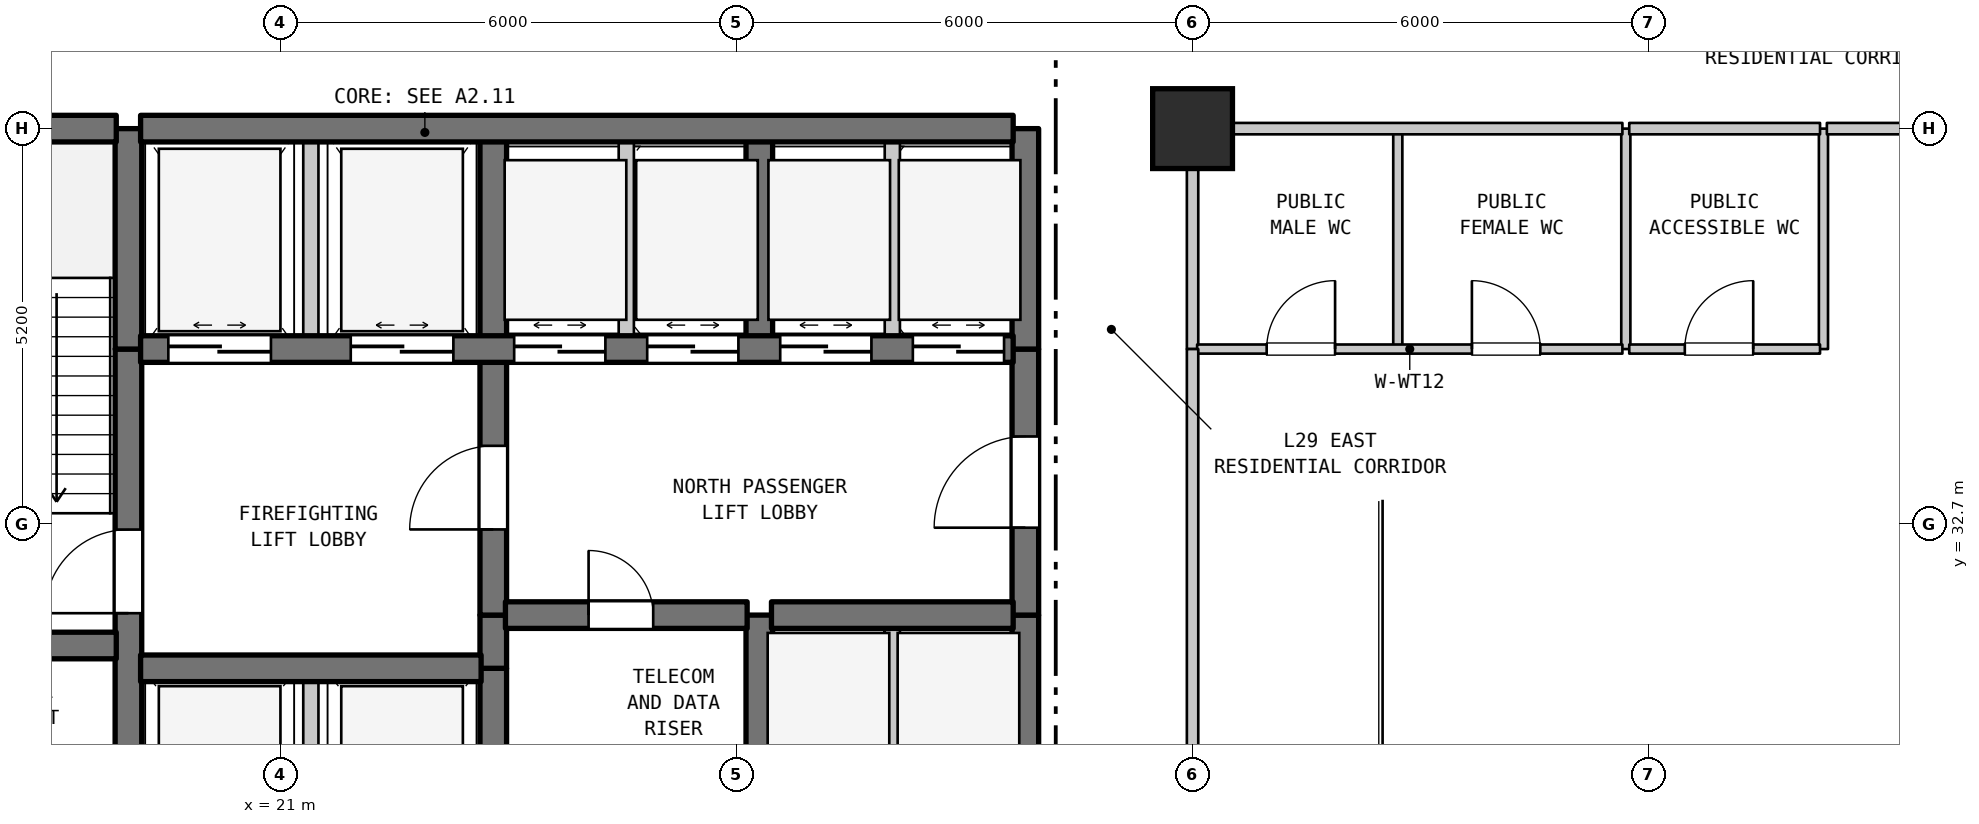
"""IFC4 building model, lengths in metres.
Left out: names, types, materials, properties, quantities, classifications, styles, units other than length and angle.
Written with IfcOpenShell. Run it as: python <this file> out.ifc"""

import sys

from ifc_helpers import new_model, si_unit, direction, frame, frame_2d, origin, origin_2d, place, context, subcontext, project, spatial, rectangle, extrude, element, fill, save


model = new_model("IFC4")
c1 = context("Model", 3, precision=1e-05, world=origin(), true_north=direction((0.0, 1.0)))
c2 = subcontext(c1, "Body", "Model", "MODEL_VIEW")
j1 = project(units=[si_unit("LENGTHUNIT", "METRE"), si_unit("PLANEANGLEUNIT", "RADIAN")], contexts=[c1])
p1 = place(None, origin())
s1 = spatial("IfcSite", under=j1, at=p1, CompositionType="ELEMENT")
p2 = place(p1, origin())
s2 = spatial("IfcBuilding", under=s1, at=p2, CompositionType="ELEMENT")
p3 = place(p2, frame((0.0, 0.0, 120.5)))
s3 = spatial("IfcBuildingStorey", under=s2, at=p3, CompositionType="ELEMENT", Elevation=120.5)
p4 = place(p3, frame((33.0, 37.9, 0.0), z_axis=(0.0, 0.0, 1.0), x_axis=(1.0, 0.0, 0.0)))
e1 = element("IfcColumn", 1, at=p4, inside=s3, PredefinedType="COLUMN", context=c2, shape_type="SweptSolid", body=[
    extrude(rectangle(XDim=1.05, YDim=1.05, at=origin_2d()), origin(), (0.0, 0.0, 1.0), 4.8),
])
p5 = place(p3, frame((19.0, 29.5, 0.0), z_axis=(0.0, 0.0, 1.0), x_axis=(0.0, 1.0, 0.0)))
e2 = element("IfcWall", 2, at=p5, inside=s3, PredefinedType="SHEAR", context=c2, shape_type="SweptSolid", body=[
    extrude(rectangle(XDim=5.5, YDim=0.35, at=frame_2d((2.75, 0.0))), origin(), (0.0, 0.0, 1.0), 4.48),
])
p6 = place(p5, frame((2.025, 0.0, 0.0)))
e3 = element("IfcOpeningElement", 3, at=p6, cuts=e2, PredefinedType="OPENING", context=c2, shape_type="SweptSolid", body=[
    extrude(rectangle(XDim=1.1, YDim=2.15, at=frame_2d((0.55, 1.075))), frame((0.0, 0.185, 0.0), z_axis=(0.0, -1.0, 0.0), x_axis=(1.0, 0.0, 0.0)), (0.0, 0.0, 1.0), 0.37),
])
p7 = place(p3, frame((19.0, 35.0, 0.0), z_axis=(0.0, 0.0, 1.0), x_axis=(0.0, 1.0, 0.0)))
e4 = element("IfcWall", 4, at=p7, inside=s3, PredefinedType="SHEAR", context=c2, shape_type="SweptSolid", body=[
    extrude(rectangle(XDim=2.9, YDim=0.35, at=frame_2d((1.45, 0.0))), origin(), (0.0, 0.0, 1.0), 4.48),
])
p8 = place(p3, frame((21.4, 28.2, 0.0), z_axis=(0.0, 0.0, 1.0), x_axis=(0.0, 1.0, 0.0)))
e5 = element("IfcWall", 5, at=p8, inside=s3, PredefinedType="STANDARD", context=c2, shape_type="SweptSolid", body=[
    extrude(rectangle(XDim=2.6, YDim=0.2, at=frame_2d((1.3, 0.0))), origin(), (0.0, 0.0, 1.0), 4.48),
])
p9 = place(p3, frame((21.4, 35.0, 0.0), z_axis=(0.0, 0.0, 1.0), x_axis=(0.0, 1.0, 0.0)))
e6 = element("IfcWall", 6, at=p9, inside=s3, PredefinedType="STANDARD", context=c2, shape_type="SweptSolid", body=[
    extrude(rectangle(XDim=2.9, YDim=0.2, at=frame_2d((1.45, 0.0))), origin(), (0.0, 0.0, 1.0), 4.48),
])
p10 = place(p3, frame((23.8, 29.5, 0.0), z_axis=(0.0, 0.0, 1.0), x_axis=(0.0, 1.0, 0.0)))
e7 = element("IfcWall", 7, at=p10, inside=s3, PredefinedType="SHEAR", context=c2, shape_type="SweptSolid", body=[
    extrude(rectangle(XDim=1.3, YDim=0.35, at=frame_2d((0.65, 0.0))), origin(), (0.0, 0.0, 1.0), 4.48),
])
p11 = place(p3, frame((23.8, 30.8, 0.0), z_axis=(0.0, 0.0, 1.0), x_axis=(0.0, 1.0, 0.0)))
e8 = element("IfcWall", 8, at=p11, inside=s3, PredefinedType="SHEAR", context=c2, shape_type="SweptSolid", body=[
    extrude(rectangle(XDim=0.7, YDim=0.35, at=frame_2d((0.35, 0.0))), origin(), (0.0, 0.0, 1.0), 4.48),
])
p12 = place(p3, frame((23.8, 31.5, 0.0), z_axis=(0.0, 0.0, 1.0), x_axis=(0.0, 1.0, 0.0)))
e9 = element("IfcWall", 9, at=p12, inside=s3, PredefinedType="SHEAR", context=c2, shape_type="SweptSolid", body=[
    extrude(rectangle(XDim=3.5, YDim=0.35, at=frame_2d((1.75, 0.0))), origin(), (0.0, 0.0, 1.0), 4.48),
])
p13 = place(p12, frame((1.127, 0.0, 0.0)))
e10 = element("IfcOpeningElement", 10, at=p13, cuts=e9, PredefinedType="OPENING", context=c2, shape_type="SweptSolid", body=[
    extrude(rectangle(XDim=1.1, YDim=2.15, at=frame_2d((0.55, 1.075))), frame((0.0, 0.185, 0.0), z_axis=(0.0, -1.0, 0.0), x_axis=(1.0, 0.0, 0.0)), (0.0, 0.0, 1.0), 0.37),
])
p14 = place(p3, frame((23.8, 35.0, 0.0), z_axis=(0.0, 0.0, 1.0), x_axis=(0.0, 1.0, 0.0)))
e11 = element("IfcWall", 11, at=p14, inside=s3, PredefinedType="SHEAR", context=c2, shape_type="SweptSolid", body=[
    extrude(rectangle(XDim=2.9, YDim=0.35, at=frame_2d((1.45, 0.0))), origin(), (0.0, 0.0, 1.0), 4.48),
])
p15 = place(p3, frame((25.55, 35.0, 0.0), z_axis=(0.0, 0.0, 1.0), x_axis=(0.0, 1.0, 0.0)))
e12 = element("IfcWall", 12, at=p15, inside=s3, PredefinedType="STANDARD", context=c2, shape_type="SweptSolid", body=[
    extrude(rectangle(XDim=2.9, YDim=0.2, at=frame_2d((1.45, 0.0))), origin(), (0.0, 0.0, 1.0), 4.48),
])
p16 = place(p3, frame((27.3, 29.5, 0.0), z_axis=(0.0, 0.0, 1.0), x_axis=(0.0, 1.0, 0.0)))
e13 = element("IfcWall", 13, at=p16, inside=s3, PredefinedType="SHEAR", context=c2, shape_type="SweptSolid", body=[
    extrude(rectangle(XDim=2.0, YDim=0.35, at=frame_2d((1.0, 0.0))), origin(), (0.0, 0.0, 1.0), 4.48),
])
p17 = place(p3, frame((27.3, 35.0, 0.0), z_axis=(0.0, 0.0, 1.0), x_axis=(0.0, 1.0, 0.0)))
e14 = element("IfcWall", 14, at=p17, inside=s3, PredefinedType="SHEAR", context=c2, shape_type="SweptSolid", body=[
    extrude(rectangle(XDim=2.9, YDim=0.35, at=frame_2d((1.45, 0.0))), origin(), (0.0, 0.0, 1.0), 4.48),
])
p18 = place(p3, frame((29.05, 28.9, 0.0), z_axis=(0.0, 0.0, 1.0), x_axis=(0.0, 1.0, 0.0)))
e15 = element("IfcWall", 15, at=p18, inside=s3, PredefinedType="STANDARD", context=c2, shape_type="SweptSolid", body=[
    extrude(rectangle(XDim=2.6, YDim=0.2, at=frame_2d((1.3, 0.0))), origin(), (0.0, 0.0, 1.0), 4.48),
])
p19 = place(p3, frame((29.05, 35.0, 0.0), z_axis=(0.0, 0.0, 1.0), x_axis=(0.0, 1.0, 0.0)))
e16 = element("IfcWall", 16, at=p19, inside=s3, PredefinedType="STANDARD", context=c2, shape_type="SweptSolid", body=[
    extrude(rectangle(XDim=2.9, YDim=0.2, at=frame_2d((1.45, 0.0))), origin(), (0.0, 0.0, 1.0), 4.48),
])
p20 = place(p3, frame((30.8, 28.9, 0.0), z_axis=(0.0, 0.0, 1.0), x_axis=(0.0, 1.0, 0.0)))
e17 = element("IfcWall", 17, at=p20, inside=s3, PredefinedType="SHEAR", context=c2, shape_type="SweptSolid", body=[
    extrude(rectangle(XDim=2.6, YDim=0.35, at=frame_2d((1.3, 0.0))), origin(), (0.0, 0.0, 1.0), 4.48),
])
p21 = place(p3, frame((30.8, 31.5, 0.0), z_axis=(0.0, 0.0, 1.0), x_axis=(0.0, 1.0, 0.0)))
e18 = element("IfcWall", 18, at=p21, inside=s3, PredefinedType="SHEAR", context=c2, shape_type="SweptSolid", body=[
    extrude(rectangle(XDim=3.5, YDim=0.35, at=frame_2d((1.75, 0.0))), origin(), (0.0, 0.0, 1.0), 4.48),
])
p22 = place(p21, frame((1.15, 0.0, 0.0)))
e19 = element("IfcOpeningElement", 19, at=p22, cuts=e18, PredefinedType="OPENING", context=c2, shape_type="SweptSolid", body=[
    extrude(rectangle(XDim=1.2, YDim=2.2, at=frame_2d((0.6, 1.1))), frame((0.0, 0.185, 0.0), z_axis=(0.0, -1.0, 0.0), x_axis=(1.0, 0.0, 0.0)), (0.0, 0.0, 1.0), 0.37),
])
p23 = place(p3, frame((30.8, 35.0, 0.0), z_axis=(0.0, 0.0, 1.0), x_axis=(0.0, 1.0, 0.0)))
e20 = element("IfcWall", 20, at=p23, inside=s3, PredefinedType="SHEAR", context=c2, shape_type="SweptSolid", body=[
    extrude(rectangle(XDim=2.9, YDim=0.35, at=frame_2d((1.45, 0.0))), origin(), (0.0, 0.0, 1.0), 4.48),
])
p24 = place(p3, frame((33.0, 35.0, 0.0), z_axis=(0.0, 0.0, 1.0), x_axis=(0.0, 1.0, 0.0)))
e21 = element("IfcWall", 21, at=p24, inside=s3, PredefinedType="STANDARD", context=c2, shape_type="SweptSolid", body=[
    extrude(rectangle(XDim=2.9, YDim=0.15, at=frame_2d((1.45, 0.0))), origin(), (0.0, 0.0, 1.0), 3.98),
])
for number, where, z_axis, x_axis in (
    (22, (35.7, 35.0, 0.0), (0.0, 0.0, 1.0), (0.0, 1.0, 0.0)),
    (23, (38.7, 35.0, 0.0), (0.0, 0.0, 1.0), (0.0, 1.0, 0.0)),
    (24, (41.3, 35.0, 0.0), (0.0, 0.0, 1.0), (0.0, 1.0, 0.0)),
):
    element("IfcWall", number, at=place(p3, frame(where, z_axis=z_axis, x_axis=x_axis)), inside=s3, PredefinedType="PARTITIONING", context=c2, shape_type="SweptSolid", body=[
        extrude(rectangle(XDim=2.9, YDim=0.12, at=frame_2d((1.45, 0.0))), origin(), (0.0, 0.0, 1.0), 4.48),
    ])
p25 = place(p3, frame((19.16, 30.8, 0.0), z_axis=(0.0, 0.0, 1.0), x_axis=(1.0, 0.0, 0.0)))
e25 = element("IfcWall", 25, at=p25, inside=s3, PredefinedType="SHEAR", context=c2, shape_type="SweptSolid", body=[
    extrude(rectangle(XDim=4.48, YDim=0.35, at=frame_2d((2.24, 0.0))), origin(), (0.0, 0.0, 1.0), 4.48),
])
p26 = place(p3, frame((15.16, 31.1, 0.0), z_axis=(0.0, 0.0, 1.0), x_axis=(1.0, 0.0, 0.0)))
e26 = element("IfcWall", 26, at=p26, inside=s3, PredefinedType="SHEAR", context=c2, shape_type="SweptSolid", body=[
    extrude(rectangle(XDim=3.68, YDim=0.35, at=frame_2d((1.84, 0.0))), origin(), (0.0, 0.0, 1.0), 4.48),
])
p27 = place(p3, frame((23.96, 31.5, 0.0), z_axis=(0.0, 0.0, 1.0), x_axis=(1.0, 0.0, 0.0)))
e27 = element("IfcWall", 27, at=p27, inside=s3, PredefinedType="SHEAR", context=c2, shape_type="SweptSolid", body=[
    extrude(rectangle(XDim=3.18, YDim=0.35, at=frame_2d((1.59, 0.0))), origin(), (0.0, 0.0, 1.0), 4.48),
])
p28 = place(p27, frame((1.094, 0.0, 0.0)))
e28 = element("IfcOpeningElement", 28, at=p28, cuts=e27, PredefinedType="OPENING", context=c2, shape_type="SweptSolid", body=[
    extrude(rectangle(XDim=0.85, YDim=2.1, at=frame_2d((0.425, 1.05))), frame((0.0, 0.185, 0.0), z_axis=(0.0, -1.0, 0.0), x_axis=(1.0, 0.0, 0.0)), (0.0, 0.0, 1.0), 0.37),
])
p29 = place(p3, frame((27.46, 31.5, 0.0), z_axis=(0.0, 0.0, 1.0), x_axis=(1.0, 0.0, 0.0)))
e29 = element("IfcWall", 29, at=p29, inside=s3, PredefinedType="SHEAR", context=c2, shape_type="SweptSolid", body=[
    extrude(rectangle(XDim=3.18, YDim=0.35, at=frame_2d((1.59, 0.0))), origin(), (0.0, 0.0, 1.0), 4.48),
])
p30 = place(p3, frame((19.16, 35.0, 0.0), z_axis=(0.0, 0.0, 1.0), x_axis=(1.0, 0.0, 0.0)))
e30 = element("IfcWall", 30, at=p30, inside=s3, PredefinedType="SHEAR", context=c2, shape_type="SweptSolid", body=[
    extrude(rectangle(XDim=11.48, YDim=0.35, at=frame_2d((5.74, 0.0))), origin(), (0.0, 0.0, 1.0), 4.48),
])
p31 = place(p30, frame((0.365, 0.0, 0.0)))
e31 = element("IfcOpeningElement", 31, at=p31, cuts=e30, PredefinedType="OPENING", context=c2, shape_type="SweptSolid", body=[
    extrude(rectangle(XDim=1.35, YDim=2.2, at=frame_2d((0.675, 1.1))), frame((0.0, 0.185, 0.0), z_axis=(0.0, -1.0, 0.0), x_axis=(1.0, 0.0, 0.0)), (0.0, 0.0, 1.0), 0.37),
])
p32 = place(p30, frame((2.765, 0.0, 0.0)))
e32 = element("IfcOpeningElement", 32, at=p32, cuts=e30, PredefinedType="OPENING", context=c2, shape_type="SweptSolid", body=[
    extrude(rectangle(XDim=1.35, YDim=2.2, at=frame_2d((0.675, 1.1))), frame((0.0, 0.185, 0.0), z_axis=(0.0, -1.0, 0.0), x_axis=(1.0, 0.0, 0.0)), (0.0, 0.0, 1.0), 0.37),
])
p33 = place(p30, frame((4.915, 0.0, 0.0)))
e33 = element("IfcOpeningElement", 33, at=p33, cuts=e30, PredefinedType="OPENING", context=c2, shape_type="SweptSolid", body=[
    extrude(rectangle(XDim=1.2, YDim=2.2, at=frame_2d((0.6, 1.1))), frame((0.0, 0.185, 0.0), z_axis=(0.0, -1.0, 0.0), x_axis=(1.0, 0.0, 0.0)), (0.0, 0.0, 1.0), 0.37),
])
p34 = place(p30, frame((6.665, 0.0, 0.0)))
e34 = element("IfcOpeningElement", 34, at=p34, cuts=e30, PredefinedType="OPENING", context=c2, shape_type="SweptSolid", body=[
    extrude(rectangle(XDim=1.2, YDim=2.2, at=frame_2d((0.6, 1.1))), frame((0.0, 0.185, 0.0), z_axis=(0.0, -1.0, 0.0), x_axis=(1.0, 0.0, 0.0)), (0.0, 0.0, 1.0), 0.37),
])
p35 = place(p30, frame((8.415, 0.0, 0.0)))
e35 = element("IfcOpeningElement", 35, at=p35, cuts=e30, PredefinedType="OPENING", context=c2, shape_type="SweptSolid", body=[
    extrude(rectangle(XDim=1.2, YDim=2.2, at=frame_2d((0.6, 1.1))), frame((0.0, 0.185, 0.0), z_axis=(0.0, -1.0, 0.0), x_axis=(1.0, 0.0, 0.0)), (0.0, 0.0, 1.0), 0.37),
])
p36 = place(p30, frame((10.16, 0.0, 0.0)))
e36 = element("IfcOpeningElement", 36, at=p36, cuts=e30, PredefinedType="OPENING", context=c2, shape_type="SweptSolid", body=[
    extrude(rectangle(XDim=1.2, YDim=2.2, at=frame_2d((0.6, 1.1))), frame((0.0, 0.185, 0.0), z_axis=(0.0, -1.0, 0.0), x_axis=(1.0, 0.0, 0.0)), (0.0, 0.0, 1.0), 0.37),
])
p37 = place(p3, frame((33.06, 35.0, 0.0), z_axis=(0.0, 0.0, 1.0), x_axis=(1.0, 0.0, 0.0)))
e37 = element("IfcWall", 37, at=p37, inside=s3, PredefinedType="PARTITIONING", context=c2, shape_type="SweptSolid", body=[
    extrude(rectangle(XDim=5.595, YDim=0.12, at=frame_2d((2.797, 0.0))), origin(), (0.0, 0.0, 1.0), 4.48),
])
p38 = place(p37, frame((0.915, 0.0, 0.0)))
e38 = element("IfcOpeningElement", 38, at=p38, cuts=e37, PredefinedType="OPENING", context=c2, shape_type="SweptSolid", body=[
    extrude(rectangle(XDim=0.9, YDim=2.1, at=frame_2d((0.45, 1.05))), frame((0.0, 0.07, 0.0), z_axis=(0.0, -1.0, 0.0), x_axis=(1.0, 0.0, 0.0)), (0.0, 0.0, 1.0), 0.14),
])
p39 = place(p37, frame((3.615, 0.0, 0.0)))
e39 = element("IfcOpeningElement", 39, at=p39, cuts=e37, PredefinedType="OPENING", context=c2, shape_type="SweptSolid", body=[
    extrude(rectangle(XDim=0.9, YDim=2.1, at=frame_2d((0.45, 1.05))), frame((0.0, 0.07, 0.0), z_axis=(0.0, -1.0, 0.0), x_axis=(1.0, 0.0, 0.0)), (0.0, 0.0, 1.0), 0.14),
])
p40 = place(p3, frame((38.745, 35.0, 0.0), z_axis=(0.0, 0.0, 1.0), x_axis=(1.0, 0.0, 0.0)))
e40 = element("IfcWall", 40, at=p40, inside=s3, PredefinedType="PARTITIONING", context=c2, shape_type="SweptSolid", body=[
    extrude(rectangle(XDim=2.51, YDim=0.12, at=frame_2d((1.255, 0.0))), origin(), (0.0, 0.0, 1.0), 4.48),
])
p41 = place(p40, frame((0.731, 0.0, 0.0)))
e41 = element("IfcOpeningElement", 41, at=p41, cuts=e40, PredefinedType="OPENING", context=c2, shape_type="SweptSolid", body=[
    extrude(rectangle(XDim=0.9, YDim=2.1, at=frame_2d((0.45, 1.05))), frame((0.0, 0.07, 0.0), z_axis=(0.0, -1.0, 0.0), x_axis=(1.0, 0.0, 0.0)), (0.0, 0.0, 1.0), 0.14),
])
p42 = place(p3, frame((15.16, 37.9, 0.0), z_axis=(0.0, 0.0, 1.0), x_axis=(1.0, 0.0, 0.0)))
e42 = element("IfcWall", 42, at=p42, inside=s3, PredefinedType="SHEAR", context=c2, shape_type="SweptSolid", body=[
    extrude(rectangle(XDim=3.68, YDim=0.35, at=frame_2d((1.84, 0.0))), origin(), (0.0, 0.0, 1.0), 4.48),
])
p43 = place(p3, frame((19.16, 37.9, 0.0), z_axis=(0.0, 0.0, 1.0), x_axis=(1.0, 0.0, 0.0)))
e43 = element("IfcWall", 43, at=p43, inside=s3, PredefinedType="SHEAR", context=c2, shape_type="SweptSolid", body=[
    extrude(rectangle(XDim=11.48, YDim=0.35, at=frame_2d((5.74, 0.0))), origin(), (0.0, 0.0, 1.0), 4.48),
])
p44 = place(p3, frame((33.06, 37.9, 0.0), z_axis=(0.0, 0.0, 1.0), x_axis=(1.0, 0.0, 0.0)))
e44 = element("IfcWall", 44, at=p44, inside=s3, PredefinedType="STANDARD", context=c2, shape_type="SweptSolid", body=[
    extrude(rectangle(XDim=5.595, YDim=0.15, at=frame_2d((2.797, 0.0))), origin(), (0.0, 0.0, 1.0), 4.48),
])
p45 = place(p3, frame((38.745, 37.9, 0.0), z_axis=(0.0, 0.0, 1.0), x_axis=(1.0, 0.0, 0.0)))
e45 = element("IfcWall", 45, at=p45, inside=s3, PredefinedType="STANDARD", context=c2, shape_type="SweptSolid", body=[
    extrude(rectangle(XDim=2.51, YDim=0.15, at=frame_2d((1.255, 0.0))), origin(), (0.0, 0.0, 1.0), 4.48),
])
p46 = place(p3, frame((41.345, 37.9, 0.0), z_axis=(0.0, 0.0, 1.0), x_axis=(1.0, 0.0, 0.0)))
e46 = element("IfcWall", 46, at=p46, inside=s3, PredefinedType="STANDARD", context=c2, shape_type="SweptSolid", body=[
    extrude(rectangle(XDim=18.705, YDim=0.15, at=frame_2d((9.353, 0.0))), origin(), (0.0, 0.0, 1.0), 4.48),
])
p47 = place(p3, frame((33.0, 27.9, 0.0), z_axis=(0.0, 0.0, 1.0), x_axis=(0.0, 1.0, 0.0)))
e47 = element("IfcWall", 47, at=p47, inside=s3, PredefinedType="STANDARD", context=c2, shape_type="SweptSolid", body=[
    extrude(rectangle(XDim=7.1, YDim=0.15, at=frame_2d((3.55, 0.0))), origin(), (0.0, 0.0, 1.0), 3.98),
])
p48 = place(p6, origin())
e48 = element("IfcDoor", 48, at=p48, inside=s3, OperationType="SINGLE_SWING_LEFT", PredefinedType="DOOR", context=c2, shape_type="SweptSolid", body=[
    extrude(rectangle(XDim=1.1, YDim=2.15, at=frame_2d((0.55, 1.075))), frame((0.0, 0.025, 0.0), z_axis=(0.0, -1.0, 0.0), x_axis=(1.0, 0.0, 0.0)), (0.0, 0.0, 1.0), 0.05),
])
fill(e3, e48)
p49 = place(p13, origin())
e49 = element("IfcDoor", 49, at=p49, inside=s3, OperationType="SINGLE_SWING_LEFT", PredefinedType="DOOR", context=c2, shape_type="SweptSolid", body=[
    extrude(rectangle(XDim=1.1, YDim=2.15, at=frame_2d((0.55, 1.075))), frame((0.0, 0.025, 0.0), z_axis=(0.0, -1.0, 0.0), x_axis=(1.0, 0.0, 0.0)), (0.0, 0.0, 1.0), 0.05),
])
fill(e10, e49)
p50 = place(p22, origin())
e50 = element("IfcDoor", 50, at=p50, inside=s3, OperationType="SINGLE_SWING_LEFT", PredefinedType="DOOR", context=c2, shape_type="SweptSolid", body=[
    extrude(rectangle(XDim=1.2, YDim=2.2, at=frame_2d((0.6, 1.1))), frame((0.0, 0.025, 0.0), z_axis=(0.0, -1.0, 0.0), x_axis=(1.0, 0.0, 0.0)), (0.0, 0.0, 1.0), 0.05),
])
fill(e19, e50)
p51 = place(p28, origin())
e51 = element("IfcDoor", 51, at=p51, inside=s3, OperationType="SINGLE_SWING_LEFT", PredefinedType="DOOR", context=c2, shape_type="SweptSolid", body=[
    extrude(rectangle(XDim=0.85, YDim=2.1, at=frame_2d((0.425, 1.05))), frame((0.0, 0.025, 0.0), z_axis=(0.0, -1.0, 0.0), x_axis=(1.0, 0.0, 0.0)), (0.0, 0.0, 1.0), 0.05),
])
fill(e28, e51)
p52 = place(p31, origin())
e52 = element("IfcDoor", 52, at=p52, inside=s3, OperationType="DOUBLE_DOOR_SLIDING", PredefinedType="DOOR", context=c2, shape_type="SweptSolid", body=[
    extrude(rectangle(XDim=1.35, YDim=2.2, at=frame_2d((0.675, 1.1))), frame((0.0, 0.025, 0.0), z_axis=(0.0, -1.0, 0.0), x_axis=(1.0, 0.0, 0.0)), (0.0, 0.0, 1.0), 0.05),
])
fill(e31, e52)
p53 = place(p32, origin())
e53 = element("IfcDoor", 53, at=p53, inside=s3, OperationType="DOUBLE_DOOR_SLIDING", PredefinedType="DOOR", context=c2, shape_type="SweptSolid", body=[
    extrude(rectangle(XDim=1.35, YDim=2.2, at=frame_2d((0.675, 1.1))), frame((0.0, 0.025, 0.0), z_axis=(0.0, -1.0, 0.0), x_axis=(1.0, 0.0, 0.0)), (0.0, 0.0, 1.0), 0.05),
])
fill(e32, e53)
p54 = place(p33, origin())
e54 = element("IfcDoor", 54, at=p54, inside=s3, OperationType="DOUBLE_DOOR_SLIDING", PredefinedType="DOOR", context=c2, shape_type="SweptSolid", body=[
    extrude(rectangle(XDim=1.2, YDim=2.2, at=frame_2d((0.6, 1.1))), frame((0.0, 0.025, 0.0), z_axis=(0.0, -1.0, 0.0), x_axis=(1.0, 0.0, 0.0)), (0.0, 0.0, 1.0), 0.05),
])
fill(e33, e54)
p55 = place(p34, origin())
e55 = element("IfcDoor", 55, at=p55, inside=s3, OperationType="DOUBLE_DOOR_SLIDING", PredefinedType="DOOR", context=c2, shape_type="SweptSolid", body=[
    extrude(rectangle(XDim=1.2, YDim=2.2, at=frame_2d((0.6, 1.1))), frame((0.0, 0.025, 0.0), z_axis=(0.0, -1.0, 0.0), x_axis=(1.0, 0.0, 0.0)), (0.0, 0.0, 1.0), 0.05),
])
fill(e34, e55)
p56 = place(p35, origin())
e56 = element("IfcDoor", 56, at=p56, inside=s3, OperationType="DOUBLE_DOOR_SLIDING", PredefinedType="DOOR", context=c2, shape_type="SweptSolid", body=[
    extrude(rectangle(XDim=1.2, YDim=2.2, at=frame_2d((0.6, 1.1))), frame((0.0, 0.025, 0.0), z_axis=(0.0, -1.0, 0.0), x_axis=(1.0, 0.0, 0.0)), (0.0, 0.0, 1.0), 0.05),
])
fill(e35, e56)
p57 = place(p36, origin())
e57 = element("IfcDoor", 57, at=p57, inside=s3, OperationType="DOUBLE_DOOR_SLIDING", PredefinedType="DOOR", context=c2, shape_type="SweptSolid", body=[
    extrude(rectangle(XDim=1.2, YDim=2.2, at=frame_2d((0.6, 1.1))), frame((0.0, 0.025, 0.0), z_axis=(0.0, -1.0, 0.0), x_axis=(1.0, 0.0, 0.0)), (0.0, 0.0, 1.0), 0.05),
])
fill(e36, e57)
p58 = place(p38, origin())
e58 = element("IfcDoor", 58, at=p58, inside=s3, OperationType="SINGLE_SWING_RIGHT", PredefinedType="DOOR", context=c2, shape_type="SweptSolid", body=[
    extrude(rectangle(XDim=0.9, YDim=2.1, at=frame_2d((0.45, 1.05))), frame((0.0, 0.025, 0.0), z_axis=(0.0, -1.0, 0.0), x_axis=(1.0, 0.0, 0.0)), (0.0, 0.0, 1.0), 0.05),
])
fill(e38, e58)
p59 = place(p39, origin())
e59 = element("IfcDoor", 59, at=p59, inside=s3, OperationType="SINGLE_SWING_LEFT", PredefinedType="DOOR", context=c2, shape_type="SweptSolid", body=[
    extrude(rectangle(XDim=0.9, YDim=2.1, at=frame_2d((0.45, 1.05))), frame((0.0, 0.025, 0.0), z_axis=(0.0, -1.0, 0.0), x_axis=(1.0, 0.0, 0.0)), (0.0, 0.0, 1.0), 0.05),
])
fill(e39, e59)
p60 = place(p41, origin())
e60 = element("IfcDoor", 60, at=p60, inside=s3, OperationType="SINGLE_SWING_RIGHT", PredefinedType="DOOR", context=c2, shape_type="SweptSolid", body=[
    extrude(rectangle(XDim=0.9, YDim=2.1, at=frame_2d((0.45, 1.05))), frame((0.0, 0.025, 0.0), z_axis=(0.0, -1.0, 0.0), x_axis=(1.0, 0.0, 0.0)), (0.0, 0.0, 1.0), 0.05),
])
fill(e41, e60)
save(model, sys.argv[1])
